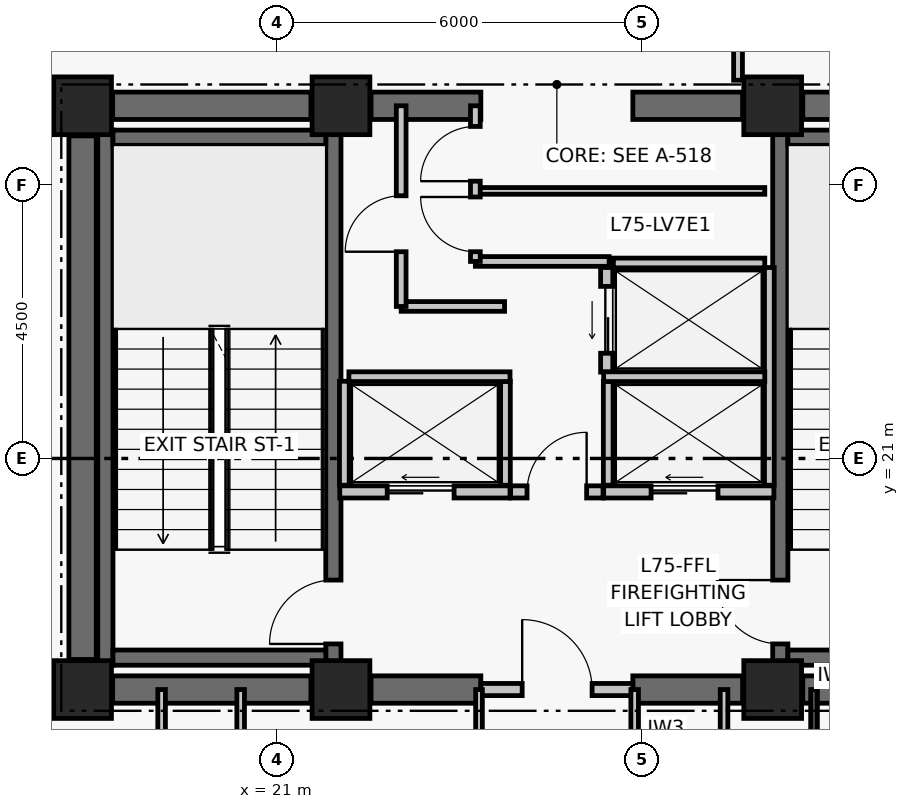
"""IFC4 building model, lengths in metres.
Left out: names, types, materials, properties, quantities, classifications, styles, units other than length and angle.
Written with IfcOpenShell. Run it as: python <this file> out.ifc"""

import sys

from ifc_helpers import new_model, si_unit, direction, frame, frame_2d, origin, origin_2d, place, context, subcontext, project, spatial, rectangle, extrude, element, fill, save


model = new_model("IFC4")
c1 = context("Model", 3, precision=1e-05, world=origin(), true_north=direction((0.0, 1.0)))
c2 = subcontext(c1, "Body", "Model", "MODEL_VIEW")
j1 = project(units=[si_unit("LENGTHUNIT", "METRE"), si_unit("PLANEANGLEUNIT", "RADIAN")], contexts=[c1])
p1 = place(None, origin())
s1 = spatial("IfcSite", under=j1, at=p1, CompositionType="ELEMENT")
p2 = place(p1, origin())
s2 = spatial("IfcBuilding", under=s1, at=p2, CompositionType="ELEMENT")
p3 = place(p2, frame((0.0, 0.0, 295.5)))
s3 = spatial("IfcBuildingStorey", under=s2, at=p3, CompositionType="ELEMENT", Elevation=295.5)
for number, where, z_axis, x_axis in (
    (1, (17.8, 17.2, 0.0), (0.0, 0.0, 1.0), (1.0, 0.0, 0.0)),
    (2, (22.05, 17.2, 0.0), (0.0, 0.0, 1.0), (1.0, 0.0, 0.0)),
    (3, (29.15, 17.2, 0.0), (0.0, 0.0, 1.0), (1.0, 0.0, 0.0)),
    (4, (17.8, 26.8, 0.0), (0.0, 0.0, 1.0), (1.0, 0.0, 0.0)),
    (5, (22.05, 26.8, 0.0), (0.0, 0.0, 1.0), (1.0, 0.0, 0.0)),
    (6, (29.15, 26.8, 0.0), (0.0, 0.0, 1.0), (1.0, 0.0, 0.0)),
):
    element("IfcColumn", number, at=place(p3, frame(where, z_axis=z_axis, x_axis=x_axis)), inside=s3, PredefinedType="COLUMN", context=c2, shape_type="SweptSolid", body=[
        extrude(rectangle(XDim=0.95, YDim=0.95, at=origin_2d()), origin(), (0.0, 0.0, 1.0), 3.72),
    ])
p4 = place(p3, frame((18.295, 17.2, 0.0), z_axis=(0.0, 0.0, 1.0), x_axis=(1.0, 0.0, 0.0)))
e7 = element("IfcWall", 7, at=p4, inside=s3, PredefinedType="SHEAR", context=c2, shape_type="SweptSolid", body=[
    extrude(rectangle(XDim=3.26, YDim=0.45, at=frame_2d((1.63, 0.0))), origin(), (0.0, 0.0, 1.0), 3.44),
])
p5 = place(p3, frame((22.545, 17.2, 0.0), z_axis=(0.0, 0.0, 1.0), x_axis=(1.0, 0.0, 0.0)))
e8 = element("IfcWall", 8, at=p5, inside=s3, PredefinedType="SHEAR", context=c2, shape_type="SweptSolid", body=[
    extrude(rectangle(XDim=1.805, YDim=0.45, at=frame_2d((0.903, 0.0))), origin(), (0.0, 0.0, 1.0), 3.44),
])
p6 = place(p3, frame((26.85, 17.2, 0.0), z_axis=(0.0, 0.0, 1.0), x_axis=(1.0, 0.0, 0.0)))
e9 = element("IfcWall", 9, at=p6, inside=s3, PredefinedType="SHEAR", context=c2, shape_type="SweptSolid", body=[
    extrude(rectangle(XDim=1.805, YDim=0.45, at=frame_2d((0.902, 0.0))), origin(), (0.0, 0.0, 1.0), 3.44),
])
for number, where, z_axis, x_axis in (
    (10, (29.645, 17.2, 0.0), (0.0, 0.0, 1.0), (1.0, 0.0, 0.0)),
    (11, (18.295, 26.8, 0.0), (0.0, 0.0, 1.0), (1.0, 0.0, 0.0)),
):
    element("IfcWall", number, at=place(p3, frame(where, z_axis=z_axis, x_axis=x_axis)), inside=s3, PredefinedType="SHEAR", context=c2, shape_type="SweptSolid", body=[
        extrude(rectangle(XDim=3.26, YDim=0.45, at=frame_2d((1.63, 0.0))), origin(), (0.0, 0.0, 1.0), 3.44),
    ])
p7 = place(p3, frame((22.545, 26.8, 0.0), z_axis=(0.0, 0.0, 1.0), x_axis=(1.0, 0.0, 0.0)))
e12 = element("IfcWall", 12, at=p7, inside=s3, PredefinedType="SHEAR", context=c2, shape_type="SweptSolid", body=[
    extrude(rectangle(XDim=1.805, YDim=0.45, at=frame_2d((0.903, 0.0))), origin(), (0.0, 0.0, 1.0), 3.44),
])
p8 = place(p3, frame((26.85, 26.8, 0.0), z_axis=(0.0, 0.0, 1.0), x_axis=(1.0, 0.0, 0.0)))
e13 = element("IfcWall", 13, at=p8, inside=s3, PredefinedType="SHEAR", context=c2, shape_type="SweptSolid", body=[
    extrude(rectangle(XDim=1.805, YDim=0.45, at=frame_2d((0.902, 0.0))), origin(), (0.0, 0.0, 1.0), 3.44),
])
p9 = place(p3, frame((29.645, 26.8, 0.0), z_axis=(0.0, 0.0, 1.0), x_axis=(1.0, 0.0, 0.0)))
e14 = element("IfcWall", 14, at=p9, inside=s3, PredefinedType="SHEAR", context=c2, shape_type="SweptSolid", body=[
    extrude(rectangle(XDim=3.26, YDim=0.45, at=frame_2d((1.63, 0.0))), origin(), (0.0, 0.0, 1.0), 3.44),
])
p10 = place(p3, frame((17.8, 17.695, 0.0), z_axis=(0.0, 0.0, 1.0), x_axis=(0.0, 1.0, 0.0)))
e15 = element("IfcWall", 15, at=p10, inside=s3, PredefinedType="SHEAR", context=c2, shape_type="SweptSolid", body=[
    extrude(rectangle(XDim=8.61, YDim=0.45, at=frame_2d((4.305, 0.0))), origin(), (0.0, 0.0, 1.0), 3.44),
])
p11 = place(p3, frame((18.175, 17.6, 0.0), z_axis=(0.0, 0.0, 1.0), x_axis=(0.0, 1.0, 0.0)))
e16 = element("IfcWall", 16, at=p11, inside=s3, PredefinedType="SHEAR", context=c2, shape_type="SweptSolid", body=[
    extrude(rectangle(XDim=8.8, YDim=0.25, at=frame_2d((4.4, 0.0))), origin(), (0.0, 0.0, 1.0), 3.44),
])
p12 = place(p3, frame((21.925, 17.6, 0.0), z_axis=(0.0, 0.0, 1.0), x_axis=(0.0, 1.0, 0.0)))
e17 = element("IfcWall", 17, at=p12, inside=s3, PredefinedType="SHEAR", context=c2, shape_type="SweptSolid", body=[
    extrude(rectangle(XDim=8.8, YDim=0.25, at=frame_2d((4.4, 0.0))), origin(), (0.0, 0.0, 1.0), 3.44),
])
p13 = place(p12, frame((0.35, 0.0, 0.0)))
e18 = element("IfcOpeningElement", 18, at=p13, cuts=e17, PredefinedType="OPENING", context=c2, shape_type="SweptSolid", body=[
    extrude(rectangle(XDim=1.05, YDim=2.08, at=frame_2d((0.525, 1.04))), frame((0.0, 0.135, 0.0), z_axis=(0.0, -1.0, 0.0), x_axis=(1.0, 0.0, 0.0)), (0.0, 0.0, 1.0), 0.27),
])
for number, where, z_axis, x_axis in (
    (19, (18.3, 17.725, 0.0), (0.0, 0.0, 1.0), (1.0, 0.0, 0.0)),
    (20, (18.3, 26.275, 0.0), (0.0, 0.0, 1.0), (1.0, 0.0, 0.0)),
):
    element("IfcWall", number, at=place(p3, frame(where, z_axis=z_axis, x_axis=x_axis)), inside=s3, PredefinedType="SHEAR", context=c2, shape_type="SweptSolid", body=[
        extrude(rectangle(XDim=3.5, YDim=0.25, at=frame_2d((1.75, 0.0))), origin(), (0.0, 0.0, 1.0), 3.44),
    ])
p14 = place(p3, frame((29.275, 17.6, 0.0), z_axis=(0.0, 0.0, 1.0), x_axis=(0.0, 1.0, 0.0)))
e21 = element("IfcWall", 21, at=p14, inside=s3, PredefinedType="SHEAR", context=c2, shape_type="SweptSolid", body=[
    extrude(rectangle(XDim=8.8, YDim=0.25, at=frame_2d((4.4, 0.0))), origin(), (0.0, 0.0, 1.0), 3.44),
])
p15 = place(p14, frame((0.35, 0.0, 0.0)))
e22 = element("IfcOpeningElement", 22, at=p15, cuts=e21, PredefinedType="OPENING", context=c2, shape_type="SweptSolid", body=[
    extrude(rectangle(XDim=1.05, YDim=2.08, at=frame_2d((0.525, 1.04))), frame((0.0, 0.135, 0.0), z_axis=(0.0, -1.0, 0.0), x_axis=(1.0, 0.0, 0.0)), (0.0, 0.0, 1.0), 0.27),
])
for number, where, z_axis, x_axis in (
    (23, (29.4, 17.725, 0.0), (0.0, 0.0, 1.0), (1.0, 0.0, 0.0)),
    (24, (29.4, 26.275, 0.0), (0.0, 0.0, 1.0), (1.0, 0.0, 0.0)),
):
    element("IfcWall", number, at=place(p3, frame(where, z_axis=z_axis, x_axis=x_axis)), inside=s3, PredefinedType="SHEAR", context=c2, shape_type="SweptSolid", body=[
        extrude(rectangle(XDim=3.5, YDim=0.25, at=frame_2d((1.75, 0.0))), origin(), (0.0, 0.0, 1.0), 3.44),
    ])
p16 = place(p3, frame((24.35, 17.2, 0.0), z_axis=(0.0, 0.0, 1.0), x_axis=(1.0, 0.0, 0.0)))
e25 = element("IfcWall", 25, at=p16, inside=s3, PredefinedType="PARTITIONING", context=c2, shape_type="SweptSolid", body=[
    extrude(rectangle(XDim=2.5, YDim=0.2, at=frame_2d((1.25, 0.0))), origin(), (0.0, 0.0, 1.0), 2.57),
])
p17 = place(p16, frame((0.68, 0.0, 0.0)))
e26 = element("IfcOpeningElement", 26, at=p17, cuts=e25, PredefinedType="OPENING", context=c2, shape_type="SweptSolid", body=[
    extrude(rectangle(XDim=1.15, YDim=2.08, at=frame_2d((0.575, 1.04))), frame((0.0, 0.11, 0.0), z_axis=(0.0, -1.0, 0.0), x_axis=(1.0, 0.0, 0.0)), (0.0, 0.0, 1.0), 0.22),
])
p18 = place(p3, frame((24.84, 20.45, 0.0), z_axis=(0.0, 0.0, 1.0), x_axis=(1.0, 0.0, 0.0)))
e27 = element("IfcWall", 27, at=p18, inside=s3, PredefinedType="PARTITIONING", context=c2, shape_type="SweptSolid", body=[
    extrude(rectangle(XDim=1.52, YDim=0.2, at=frame_2d((0.76, 0.0))), origin(), (0.0, 0.0, 1.0), 3.44),
])
p19 = place(p18, frame((0.27, 0.0, 0.0)))
e28 = element("IfcOpeningElement", 28, at=p19, cuts=e27, PredefinedType="OPENING", context=c2, shape_type="SweptSolid", body=[
    extrude(rectangle(XDim=0.98, YDim=2.06, at=frame_2d((0.49, 1.03))), frame((0.0, 0.11, 0.0), z_axis=(0.0, -1.0, 0.0), x_axis=(1.0, 0.0, 0.0)), (0.0, 0.0, 1.0), 0.22),
])
p20 = place(p3, frame((22.03, 20.45, 0.0), z_axis=(0.0, 0.0, 1.0), x_axis=(1.0, 0.0, 0.0)))
e29 = element("IfcWall", 29, at=p20, inside=s3, PredefinedType="PARTITIONING", context=c2, shape_type="SweptSolid", body=[
    extrude(rectangle(XDim=2.8, YDim=0.2, at=frame_2d((1.4, 0.0))), origin(), (0.0, 0.0, 1.0), 3.44),
])
p21 = place(p20, frame((0.78, 0.0, 0.0)))
e30 = element("IfcOpeningElement", 30, at=p21, cuts=e29, PredefinedType="OPENING", context=c2, shape_type="SweptSolid", body=[
    extrude(rectangle(XDim=1.1, YDim=2.08, at=frame_2d((0.55, 1.04))), frame((0.0, 0.11, 0.0), z_axis=(0.0, -1.0, 0.0), x_axis=(1.0, 0.0, 0.0)), (0.0, 0.0, 1.0), 0.22),
])
p22 = place(p3, frame((26.37, 20.45, 0.0), z_axis=(0.0, 0.0, 1.0), x_axis=(1.0, 0.0, 0.0)))
e31 = element("IfcWall", 31, at=p22, inside=s3, PredefinedType="PARTITIONING", context=c2, shape_type="SweptSolid", body=[
    extrude(rectangle(XDim=2.8, YDim=0.2, at=frame_2d((1.4, 0.0))), origin(), (0.0, 0.0, 1.0), 3.44),
])
p23 = place(p22, frame((0.78, 0.0, 0.0)))
e32 = element("IfcOpeningElement", 32, at=p23, cuts=e31, PredefinedType="OPENING", context=c2, shape_type="SweptSolid", body=[
    extrude(rectangle(XDim=1.1, YDim=2.08, at=frame_2d((0.55, 1.04))), frame((0.0, 0.11, 0.0), z_axis=(0.0, -1.0, 0.0), x_axis=(1.0, 0.0, 0.0)), (0.0, 0.0, 1.0), 0.22),
])
p24 = place(p3, frame((26.42, 22.42, 0.0), z_axis=(0.0, 0.0, 1.0), x_axis=(0.0, 1.0, 0.0)))
e33 = element("IfcWall", 33, at=p24, inside=s3, PredefinedType="PARTITIONING", context=c2, shape_type="SweptSolid", body=[
    extrude(rectangle(XDim=1.72, YDim=0.2, at=frame_2d((0.86, 0.0))), origin(), (0.0, 0.0, 1.0), 3.44),
])
p25 = place(p24, frame((0.31, 0.0, 0.0)))
e34 = element("IfcOpeningElement", 34, at=p25, cuts=e33, PredefinedType="OPENING", context=c2, shape_type="SweptSolid", body=[
    extrude(rectangle(XDim=1.1, YDim=2.08, at=frame_2d((0.55, 1.04))), frame((0.0, 0.11, 0.0), z_axis=(0.0, -1.0, 0.0), x_axis=(1.0, 0.0, 0.0)), (0.0, 0.0, 1.0), 0.22),
])
for number, where, z_axis, x_axis in (
    (35, (22.105, 20.56, 0.0), (0.0, 0.0, 1.0), (0.0, 1.0, 0.0)),
    (36, (24.755, 20.56, 0.0), (0.0, 0.0, 1.0), (0.0, 1.0, 0.0)),
):
    element("IfcWall", number, at=place(p3, frame(where, z_axis=z_axis, x_axis=x_axis)), inside=s3, PredefinedType="PARTITIONING", context=c2, shape_type="SweptSolid", body=[
        extrude(rectangle(XDim=1.71, YDim=0.16, at=frame_2d((0.855, 0.0))), origin(), (0.0, 0.0, 1.0), 3.44),
    ])
p26 = place(p3, frame((22.18, 22.345, 0.0), z_axis=(0.0, 0.0, 1.0), x_axis=(1.0, 0.0, 0.0)))
e37 = element("IfcWall", 37, at=p26, inside=s3, PredefinedType="PARTITIONING", context=c2, shape_type="SweptSolid", body=[
    extrude(rectangle(XDim=2.65, YDim=0.16, at=frame_2d((1.325, 0.0))), origin(), (0.0, 0.0, 1.0), 3.44),
])
p27 = place(p3, frame((29.095, 20.56, 0.0), z_axis=(0.0, 0.0, 1.0), x_axis=(0.0, 1.0, 0.0)))
e38 = element("IfcWall", 38, at=p27, inside=s3, PredefinedType="PARTITIONING", context=c2, shape_type="SweptSolid", body=[
    extrude(rectangle(XDim=3.58, YDim=0.16, at=frame_2d((1.79, 0.0))), origin(), (0.0, 0.0, 1.0), 3.44),
])
p28 = place(p3, frame((26.445, 20.56, 0.0), z_axis=(0.0, 0.0, 1.0), x_axis=(0.0, 1.0, 0.0)))
e39 = element("IfcWall", 39, at=p28, inside=s3, PredefinedType="PARTITIONING", context=c2, shape_type="SweptSolid", body=[
    extrude(rectangle(XDim=1.71, YDim=0.16, at=frame_2d((0.855, 0.0))), origin(), (0.0, 0.0, 1.0), 3.44),
])
p29 = place(p3, frame((26.37, 22.345, 0.0), z_axis=(0.0, 0.0, 1.0), x_axis=(1.0, 0.0, 0.0)))
e40 = element("IfcWall", 40, at=p29, inside=s3, PredefinedType="PARTITIONING", context=c2, shape_type="SweptSolid", body=[
    extrude(rectangle(XDim=2.65, YDim=0.16, at=frame_2d((1.325, 0.0))), origin(), (0.0, 0.0, 1.0), 3.44),
])
p30 = place(p3, frame((26.53, 24.215, 0.0), z_axis=(0.0, 0.0, 1.0), x_axis=(1.0, 0.0, 0.0)))
e41 = element("IfcWall", 41, at=p30, inside=s3, PredefinedType="PARTITIONING", context=c2, shape_type="SweptSolid", body=[
    extrude(rectangle(XDim=2.49, YDim=0.16, at=frame_2d((1.245, 0.0))), origin(), (0.0, 0.0, 1.0), 3.44),
])
p31 = place(p3, frame((23.04, 23.5, 0.0), z_axis=(0.0, 0.0, 1.0), x_axis=(1.0, 0.0, 0.0)))
e42 = element("IfcWall", 42, at=p31, inside=s3, PredefinedType="PARTITIONING", context=c2, shape_type="SweptSolid", body=[
    extrude(rectangle(XDim=1.7, YDim=0.16, at=frame_2d((0.85, 0.0))), origin(), (0.0, 0.0, 1.0), 3.44),
])
p32 = place(p3, frame((23.04, 23.5, 0.0), z_axis=(0.0, 0.0, 1.0), x_axis=(0.0, 1.0, 0.0)))
e43 = element("IfcWall", 43, at=p32, inside=s3, PredefinedType="PARTITIONING", context=c2, shape_type="SweptSolid", body=[
    extrude(rectangle(XDim=3.3, YDim=0.16, at=frame_2d((1.65, 0.0))), origin(), (0.0, 0.0, 1.0), 2.57),
])
p33 = place(p32, frame((0.9, 0.0, 0.0)))
e44 = element("IfcOpeningElement", 44, at=p33, cuts=e43, PredefinedType="OPENING", context=c2, shape_type="SweptSolid", body=[
    extrude(rectangle(XDim=0.92, YDim=2.05, at=frame_2d((0.46, 1.025))), frame((0.0, 0.09, 0.0), z_axis=(0.0, -1.0, 0.0), x_axis=(1.0, 0.0, 0.0)), (0.0, 0.0, 1.0), 0.18),
])
p34 = place(p3, frame((24.26, 24.24, 0.0), z_axis=(0.0, 0.0, 1.0), x_axis=(1.0, 0.0, 0.0)))
e45 = element("IfcWall", 45, at=p34, inside=s3, PredefinedType="PARTITIONING", context=c2, shape_type="SweptSolid", body=[
    extrude(rectangle(XDim=2.2, YDim=0.16, at=frame_2d((1.1, 0.0))), origin(), (0.0, 0.0, 1.0), 3.44),
])
p35 = place(p3, frame((24.26, 25.4, 0.0), z_axis=(0.0, 0.0, 1.0), x_axis=(1.0, 0.0, 0.0)))
e46 = element("IfcWall", 46, at=p35, inside=s3, PredefinedType="PARTITIONING", context=c2, shape_type="SweptSolid", body=[
    extrude(rectangle(XDim=4.76, YDim=0.11, at=frame_2d((2.38, 0.0))), origin(), (0.0, 0.0, 1.0), 3.44),
])
p36 = place(p3, frame((24.26, 24.24, 0.0), z_axis=(0.0, 0.0, 1.0), x_axis=(0.0, 1.0, 0.0)))
e47 = element("IfcWall", 47, at=p36, inside=s3, PredefinedType="PARTITIONING", context=c2, shape_type="SweptSolid", body=[
    extrude(rectangle(XDim=2.56, YDim=0.16, at=frame_2d((1.28, 0.0))), origin(), (0.0, 0.0, 1.0), 2.57),
])
p37 = place(p36, frame((0.16, 0.0, 0.0)))
e48 = element("IfcOpeningElement", 48, at=p37, cuts=e47, PredefinedType="OPENING", context=c2, shape_type="SweptSolid", body=[
    extrude(rectangle(XDim=0.9, YDim=2.02, at=frame_2d((0.45, 1.01))), frame((0.0, 0.09, 0.0), z_axis=(0.0, -1.0, 0.0), x_axis=(1.0, 0.0, 0.0)), (0.0, 0.0, 1.0), 0.18),
])
p38 = place(p36, frame((1.32, 0.0, 0.0)))
e49 = element("IfcOpeningElement", 49, at=p38, cuts=e47, PredefinedType="OPENING", context=c2, shape_type="SweptSolid", body=[
    extrude(rectangle(XDim=0.9, YDim=2.02, at=frame_2d((0.45, 1.01))), frame((0.0, 0.09, 0.0), z_axis=(0.0, -1.0, 0.0), x_axis=(1.0, 0.0, 0.0)), (0.0, 0.0, 1.0), 0.18),
])
for number, where, z_axis, x_axis in (
    (50, (19.1, 14.95, 0.0), (0.0, 0.0, 1.0), (0.0, 1.0, 0.0)),
    (51, (20.4, 14.95, 0.0), (0.0, 0.0, 1.0), (0.0, 1.0, 0.0)),
):
    element("IfcWall", number, at=place(p3, frame(where, z_axis=z_axis, x_axis=x_axis)), inside=s3, PredefinedType="PARTITIONING", context=c2, shape_type="SweptSolid", body=[
        extrude(rectangle(XDim=2.25, YDim=0.125, at=frame_2d((1.125, 0.0))), origin(), (0.0, 0.0, 1.0), 2.57),
    ])
p39 = place(p3, frame((24.32, 14.95, 0.0), z_axis=(0.0, 0.0, 1.0), x_axis=(0.0, 1.0, 0.0)))
e52 = element("IfcWall", 52, at=p39, inside=s3, PredefinedType="PARTITIONING", context=c2, shape_type="SweptSolid", body=[
    extrude(rectangle(XDim=2.25, YDim=0.11, at=frame_2d((1.125, 0.0))), origin(), (0.0, 0.0, 1.0), 2.57),
])
for number, where, z_axis, x_axis in (
    (53, (26.88, 14.95, 0.0), (0.0, 0.0, 1.0), (0.0, 1.0, 0.0)),
    (54, (28.35, 14.95, 0.0), (0.0, 0.0, 1.0), (0.0, 1.0, 0.0)),
):
    element("IfcWall", number, at=place(p3, frame(where, z_axis=z_axis, x_axis=x_axis)), inside=s3, PredefinedType="PARTITIONING", context=c2, shape_type="SweptSolid", body=[
        extrude(rectangle(XDim=2.25, YDim=0.125, at=frame_2d((1.125, 0.0))), origin(), (0.0, 0.0, 1.0), 2.57),
    ])
p40 = place(p3, frame((29.83, 14.95, 0.0), z_axis=(0.0, 0.0, 1.0), x_axis=(0.0, 1.0, 0.0)))
e55 = element("IfcWall", 55, at=p40, inside=s3, PredefinedType="PARTITIONING", context=c2, shape_type="SweptSolid", body=[
    extrude(rectangle(XDim=2.25, YDim=0.11, at=frame_2d((1.125, 0.0))), origin(), (0.0, 0.0, 1.0), 2.57),
])
p41 = place(p3, frame((28.58, 27.22, 0.0), z_axis=(0.0, 0.0, 1.0), x_axis=(0.0, 1.0, 0.0)))
e56 = element("IfcWall", 56, at=p41, inside=s3, PredefinedType="PARTITIONING", context=c2, shape_type="SweptSolid", body=[
    extrude(rectangle(XDim=1.48, YDim=0.145, at=frame_2d((0.74, 0.0))), origin(), (0.0, 0.0, 1.0), 2.57),
])
p42 = place(p13, origin())
e57 = element("IfcDoor", 57, at=p42, inside=s3, OperationType="SINGLE_SWING_LEFT", PredefinedType="DOOR", context=c2, shape_type="SweptSolid", body=[
    extrude(rectangle(XDim=1.05, YDim=2.08, at=frame_2d((0.525, 1.04))), frame((0.0, 0.025, 0.0), z_axis=(0.0, -1.0, 0.0), x_axis=(1.0, 0.0, 0.0)), (0.0, 0.0, 1.0), 0.05),
])
fill(e18, e57)
p43 = place(p15, origin())
e58 = element("IfcDoor", 58, at=p43, inside=s3, OperationType="SINGLE_SWING_RIGHT", PredefinedType="DOOR", context=c2, shape_type="SweptSolid", body=[
    extrude(rectangle(XDim=1.05, YDim=2.08, at=frame_2d((0.525, 1.04))), frame((0.0, 0.025, 0.0), z_axis=(0.0, -1.0, 0.0), x_axis=(1.0, 0.0, 0.0)), (0.0, 0.0, 1.0), 0.05),
])
fill(e22, e58)
p44 = place(p17, origin())
e59 = element("IfcDoor", 59, at=p44, inside=s3, OperationType="SINGLE_SWING_LEFT", PredefinedType="DOOR", context=c2, shape_type="SweptSolid", body=[
    extrude(rectangle(XDim=1.15, YDim=2.08, at=frame_2d((0.575, 1.04))), frame((0.0, 0.025, 0.0), z_axis=(0.0, -1.0, 0.0), x_axis=(1.0, 0.0, 0.0)), (0.0, 0.0, 1.0), 0.05),
])
fill(e26, e59)
p45 = place(p19, origin())
e60 = element("IfcDoor", 60, at=p45, inside=s3, OperationType="SINGLE_SWING_RIGHT", PredefinedType="DOOR", context=c2, shape_type="SweptSolid", body=[
    extrude(rectangle(XDim=0.98, YDim=2.06, at=frame_2d((0.49, 1.03))), frame((0.0, 0.025, 0.0), z_axis=(0.0, -1.0, 0.0), x_axis=(1.0, 0.0, 0.0)), (0.0, 0.0, 1.0), 0.05),
])
fill(e28, e60)
p46 = place(p21, origin())
e61 = element("IfcDoor", 61, at=p46, inside=s3, OperationType="DOUBLE_DOOR_SLIDING", PredefinedType="DOOR", context=c2, shape_type="SweptSolid", body=[
    extrude(rectangle(XDim=1.1, YDim=2.08, at=frame_2d((0.55, 1.04))), frame((0.0, 0.025, 0.0), z_axis=(0.0, -1.0, 0.0), x_axis=(1.0, 0.0, 0.0)), (0.0, 0.0, 1.0), 0.05),
])
fill(e30, e61)
p47 = place(p23, origin())
e62 = element("IfcDoor", 62, at=p47, inside=s3, OperationType="DOUBLE_DOOR_SLIDING", PredefinedType="DOOR", context=c2, shape_type="SweptSolid", body=[
    extrude(rectangle(XDim=1.1, YDim=2.08, at=frame_2d((0.55, 1.04))), frame((0.0, 0.025, 0.0), z_axis=(0.0, -1.0, 0.0), x_axis=(1.0, 0.0, 0.0)), (0.0, 0.0, 1.0), 0.05),
])
fill(e32, e62)
p48 = place(p25, origin())
e63 = element("IfcDoor", 63, at=p48, inside=s3, OperationType="DOUBLE_DOOR_SLIDING", PredefinedType="DOOR", context=c2, shape_type="SweptSolid", body=[
    extrude(rectangle(XDim=1.1, YDim=2.08, at=frame_2d((0.55, 1.04))), frame((0.0, 0.025, 0.0), z_axis=(0.0, -1.0, 0.0), x_axis=(1.0, 0.0, 0.0)), (0.0, 0.0, 1.0), 0.05),
])
fill(e34, e63)
p49 = place(p33, origin())
e64 = element("IfcDoor", 64, at=p49, inside=s3, OperationType="SINGLE_SWING_LEFT", PredefinedType="DOOR", context=c2, shape_type="SweptSolid", body=[
    extrude(rectangle(XDim=0.92, YDim=2.05, at=frame_2d((0.46, 1.025))), frame((0.0, 0.025, 0.0), z_axis=(0.0, -1.0, 0.0), x_axis=(1.0, 0.0, 0.0)), (0.0, 0.0, 1.0), 0.05),
])
fill(e44, e64)
p50 = place(p37, origin())
e65 = element("IfcDoor", 65, at=p50, inside=s3, OperationType="SINGLE_SWING_RIGHT", PredefinedType="DOOR", context=c2, shape_type="SweptSolid", body=[
    extrude(rectangle(XDim=0.9, YDim=2.02, at=frame_2d((0.45, 1.01))), frame((0.0, 0.025, 0.0), z_axis=(0.0, -1.0, 0.0), x_axis=(1.0, 0.0, 0.0)), (0.0, 0.0, 1.0), 0.05),
])
fill(e48, e65)
p51 = place(p38, origin())
e66 = element("IfcDoor", 66, at=p51, inside=s3, OperationType="SINGLE_SWING_LEFT", PredefinedType="DOOR", context=c2, shape_type="SweptSolid", body=[
    extrude(rectangle(XDim=0.9, YDim=2.02, at=frame_2d((0.45, 1.01))), frame((0.0, 0.025, 0.0), z_axis=(0.0, -1.0, 0.0), x_axis=(1.0, 0.0, 0.0)), (0.0, 0.0, 1.0), 0.05),
])
fill(e49, e66)
save(model, sys.argv[1])
